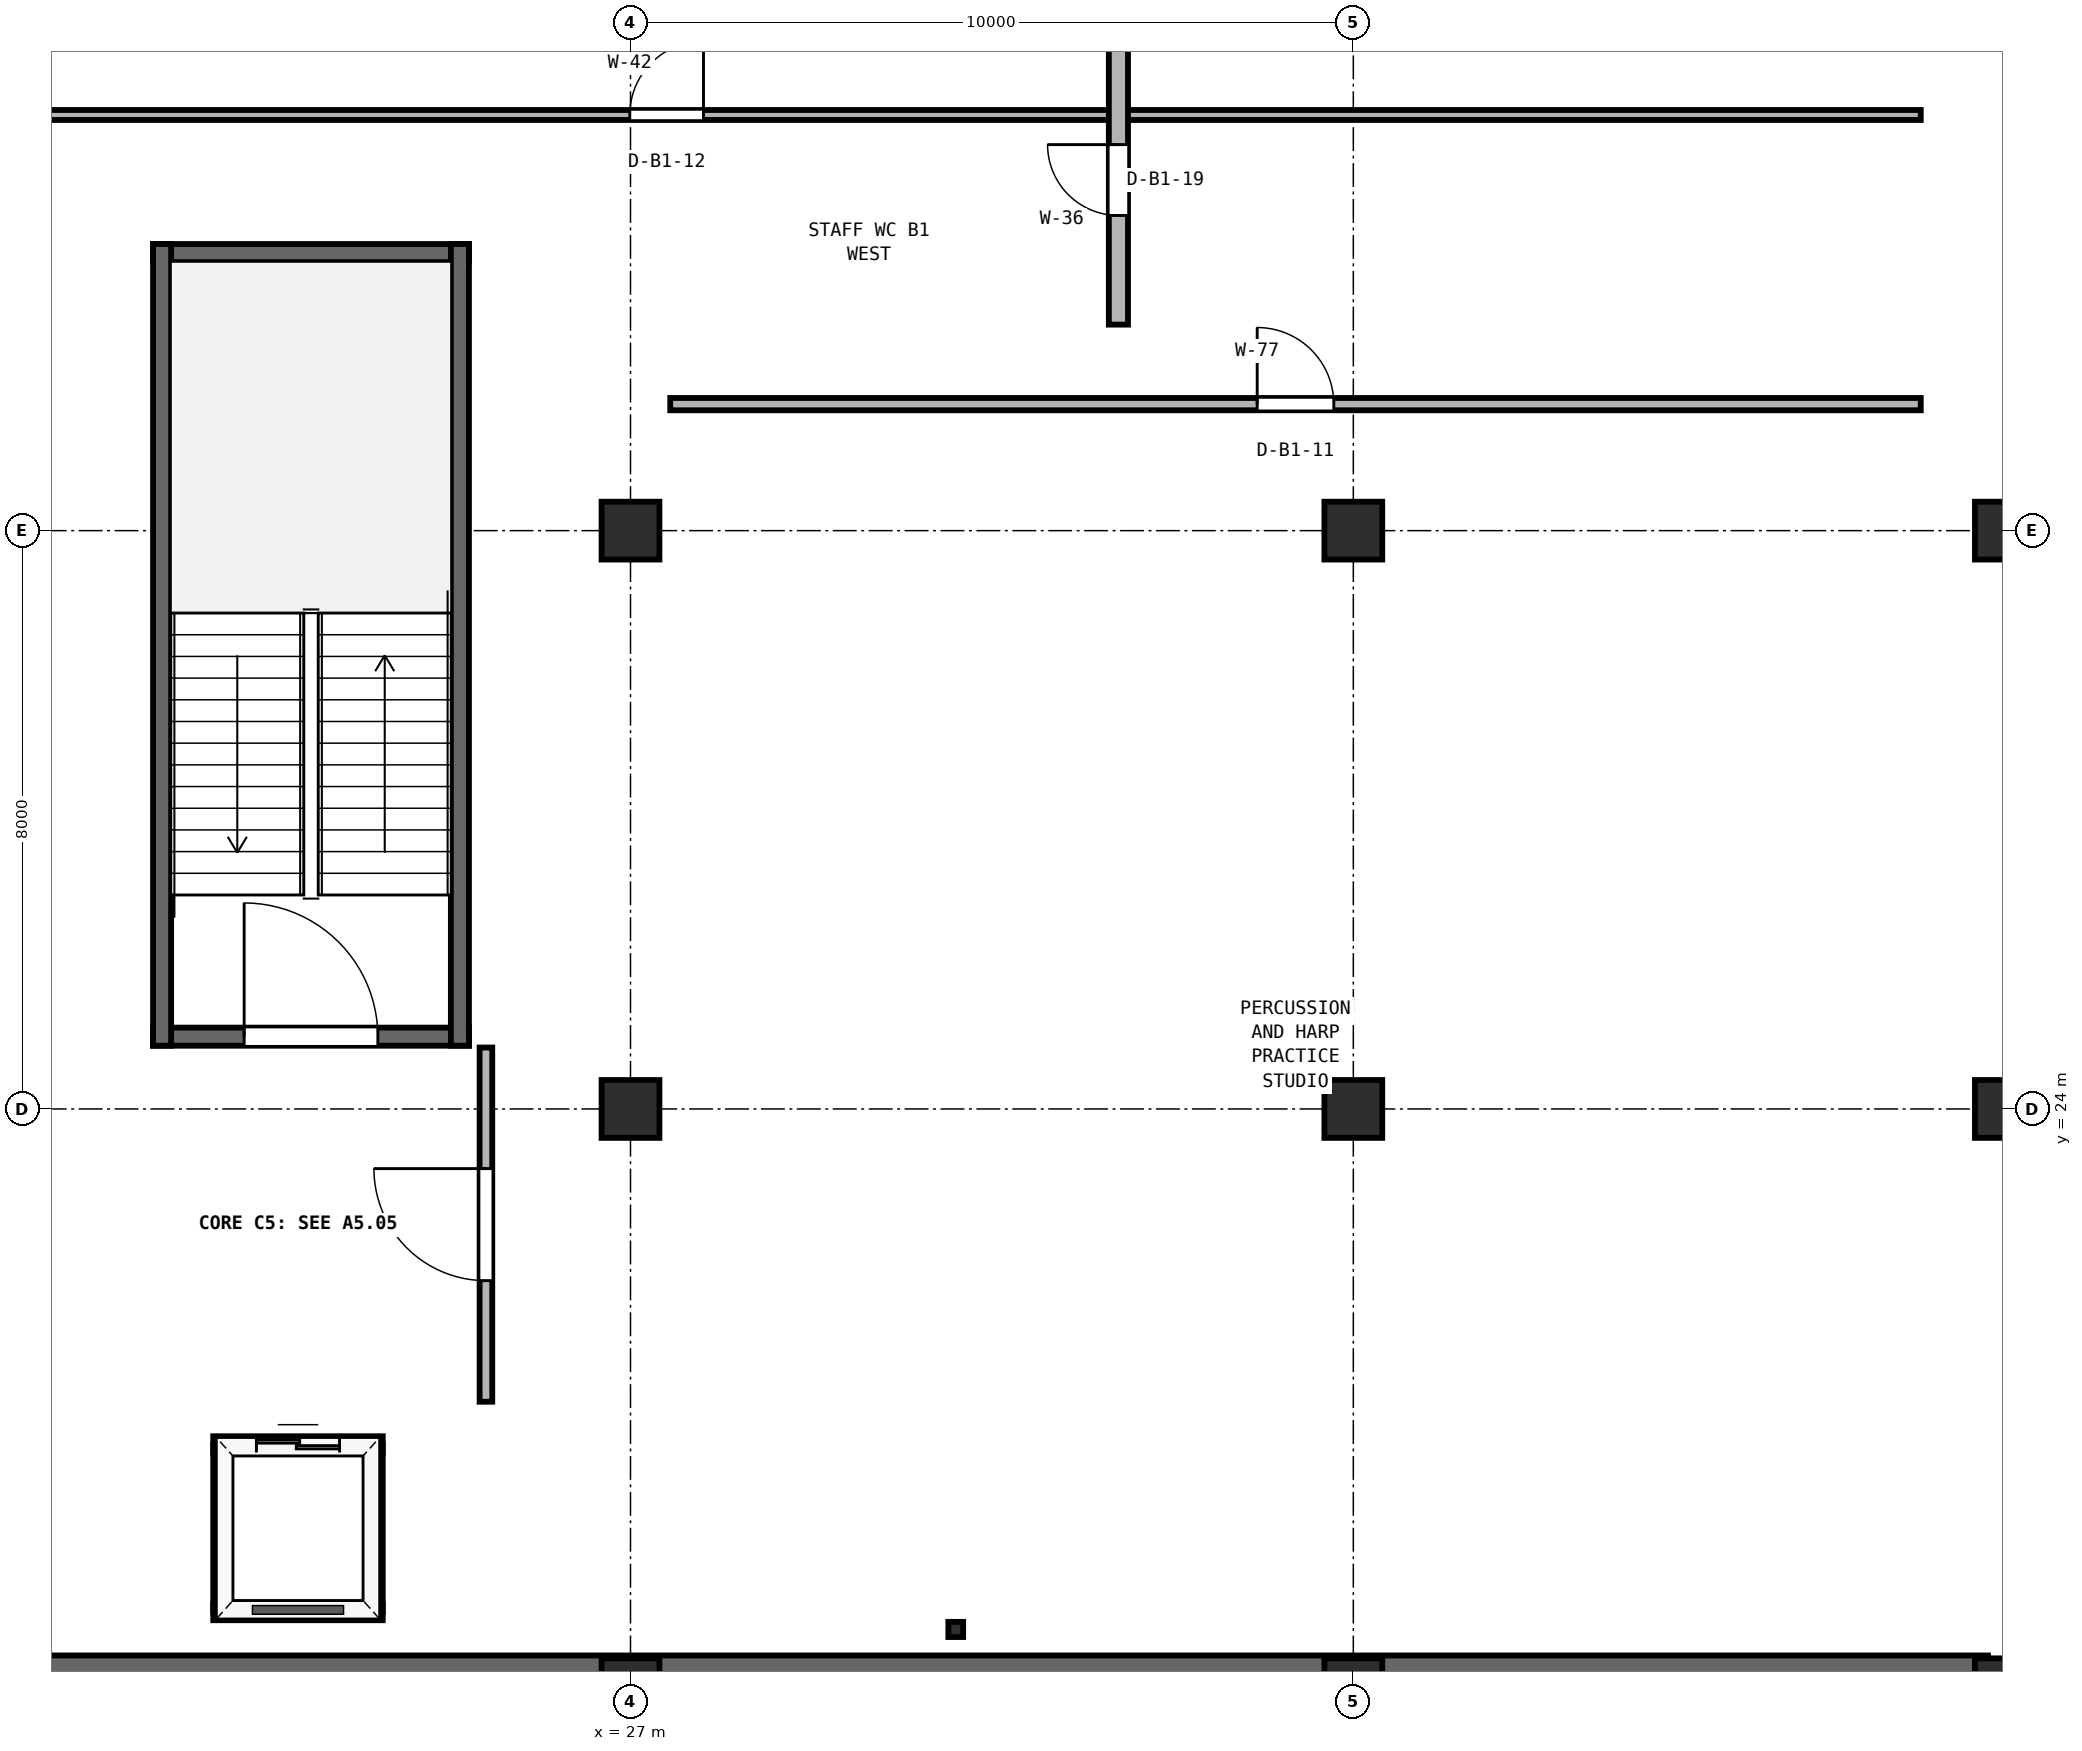
"""IFC4 building model, lengths in metres.
Left out: names, types, materials, properties, quantities, classifications, styles, units other than length and angle.
Written with IfcOpenShell. Run it as: python <this file> out.ifc"""

import sys

from ifc_helpers import new_model, si_unit, direction, frame, frame_2d, origin, origin_2d, place, context, subcontext, project, spatial, rectangle, i_section, extrude, element, fill, save


model = new_model("IFC4")
c1 = context("Model", 3, precision=1e-05, world=origin(), true_north=direction((0.0, 1.0)))
c2 = subcontext(c1, "Body", "Model", "MODEL_VIEW")
j1 = project(units=[si_unit("LENGTHUNIT", "METRE"), si_unit("PLANEANGLEUNIT", "RADIAN")], contexts=[c1])
p1 = place(None, origin())
s1 = spatial("IfcSite", under=j1, at=p1, CompositionType="ELEMENT")
p2 = place(p1, origin())
s2 = spatial("IfcBuilding", under=s1, at=p2, CompositionType="ELEMENT")
p3 = place(p2, frame((0.0, 0.0, -4.8)))
s3 = spatial("IfcBuildingStorey", under=s2, at=p3, CompositionType="ELEMENT", Elevation=-4.8)
p4 = place(p3, frame((9.22, 16.22, 0.0), z_axis=(0.0, 0.0, 1.0), x_axis=(1.0, 0.0, 0.0)))
e1 = element("IfcWall", 1, at=p4, inside=s3, PredefinedType="USERDEFINED", context=c2, shape_type="SweptSolid", body=[
    extrude(rectangle(XDim=36.56, YDim=0.44, at=frame_2d((18.28, 0.0))), origin(), (0.0, 0.0, 1.0), 3.85),
])
for number, where, z_axis, x_axis in (
    (2, (27.0, 16.0, -0.4), (0.0, 0.0, 1.0), (1.0, 0.0, 0.0)),
    (3, (27.0, 24.0, -0.4), (0.0, 0.0, 1.0), (1.0, 0.0, 0.0)),
    (4, (27.0, 32.0, -0.4), (0.0, 0.0, 1.0), (1.0, 0.0, 0.0)),
    (5, (37.0, 16.0, -0.4), (0.0, 0.0, 1.0), (1.0, 0.0, 0.0)),
    (6, (37.0, 24.0, -0.4), (0.0, 0.0, 1.0), (1.0, 0.0, 0.0)),
    (7, (37.0, 32.0, -0.4), (0.0, 0.0, 1.0), (1.0, 0.0, 0.0)),
    (8, (46.0, 16.0, -0.4), (0.0, 0.0, 1.0), (1.0, 0.0, 0.0)),
    (9, (46.0, 24.0, -0.4), (0.0, 0.0, 1.0), (1.0, 0.0, 0.0)),
    (10, (46.0, 32.0, -0.4), (0.0, 0.0, 1.0), (1.0, 0.0, 0.0)),
):
    element("IfcColumn", number, at=place(p3, frame(where, z_axis=z_axis, x_axis=x_axis)), inside=s3, PredefinedType="COLUMN", context=c2, shape_type="SweptSolid", body=[
        extrude(rectangle(XDim=0.8, YDim=0.8, at=origin_2d()), origin(), (0.0, 0.0, 1.0), 4.9),
    ])
for number, where, z_axis, x_axis in (
    (11, (31.5, 16.8, -0.4), (0.0, 0.0, 1.0), (1.0, 0.0, 0.0)),
    (12, (22.5, 17.8, -0.4), (0.0, 0.0, 1.0), (1.0, 0.0, 0.0)),
):
    element("IfcColumn", number, at=place(p3, frame(where, z_axis=z_axis, x_axis=x_axis)), inside=s3, PredefinedType="COLUMN", context=c2, shape_type="SweptSolid", body=[
        extrude(i_section(OverallWidth=0.205, OverallDepth=0.21, WebThickness=0.009, FlangeThickness=0.014, FilletRadius=0.011, at=origin_2d()), origin(), (0.0, 0.0, 1.0), 4.9),
    ])
p5 = place(p3, frame((20.395, 25.0, 0.0), z_axis=(0.0, 0.0, 1.0), x_axis=(1.0, 0.0, 0.0)))
e13 = element("IfcWall", 13, at=p5, inside=s3, PredefinedType="SHEAR", context=c2, shape_type="SweptSolid", body=[
    extrude(rectangle(XDim=4.37, YDim=0.25, at=frame_2d((2.185, 0.0))), origin(), (0.0, 0.0, 1.0), 4.5),
])
p6 = place(p5, frame((1.26, 0.0, 0.0)))
e14 = element("IfcOpeningElement", 14, at=p6, cuts=e13, PredefinedType="OPENING", context=c2, shape_type="SweptSolid", body=[
    extrude(rectangle(XDim=1.85, YDim=2.25, at=frame_2d((0.925, 1.125))), frame((0.0, 0.135, 0.0), z_axis=(0.0, -1.0, 0.0), x_axis=(1.0, 0.0, 0.0)), (0.0, 0.0, 1.0), 0.27),
])
p7 = place(p3, frame((20.395, 35.84, 0.0), z_axis=(0.0, 0.0, 1.0), x_axis=(1.0, 0.0, 0.0)))
e15 = element("IfcWall", 15, at=p7, inside=s3, PredefinedType="SHEAR", context=c2, shape_type="SweptSolid", body=[
    extrude(rectangle(XDim=4.37, YDim=0.25, at=frame_2d((2.185, 0.0))), origin(), (0.0, 0.0, 1.0), 4.5),
])
for number, where, z_axis, x_axis in (
    (16, (20.52, 24.875, 0.0), (0.0, 0.0, 1.0), (0.0, 1.0, 0.0)),
    (17, (24.64, 24.875, 0.0), (0.0, 0.0, 1.0), (0.0, 1.0, 0.0)),
):
    element("IfcWall", number, at=place(p3, frame(where, z_axis=z_axis, x_axis=x_axis)), inside=s3, PredefinedType="SHEAR", context=c2, shape_type="SweptSolid", body=[
        extrude(rectangle(XDim=11.09, YDim=0.25, at=frame_2d((5.545, 0.0))), origin(), (0.0, 0.0, 1.0), 4.5),
    ])
p8 = place(p3, frame((25.0, 19.95, 0.0), z_axis=(0.0, 0.0, 1.0), x_axis=(0.0, 1.0, 0.0)))
e18 = element("IfcWall", 18, at=p8, inside=s3, PredefinedType="PARTITIONING", context=c2, shape_type="SweptSolid", body=[
    extrude(rectangle(XDim=4.9, YDim=0.175, at=frame_2d((2.45, 0.0))), origin(), (0.0, 0.0, 1.0), 4.45),
])
p9 = place(p8, frame((1.675, 0.0, 0.0)))
e19 = element("IfcOpeningElement", 19, at=p9, cuts=e18, PredefinedType="OPENING", context=c2, shape_type="SweptSolid", body=[
    extrude(rectangle(XDim=1.55, YDim=2.22, at=frame_2d((0.775, 1.11))), frame((0.0, 0.097, 0.0), z_axis=(0.0, -1.0, 0.0), x_axis=(1.0, 0.0, 0.0)), (0.0, 0.0, 1.0), 0.195),
])
p10 = place(p3, frame((21.228, 19.36, 0.0), z_axis=(0.0, 0.0, 1.0), x_axis=(1.0, 0.0, 0.0)))
e20 = element("IfcWall", 20, at=p10, inside=s3, PredefinedType="SOLIDWALL", context=c2, shape_type="SweptSolid", body=[
    extrude(rectangle(XDim=2.345, YDim=0.225, at=frame_2d((1.172, 0.0))), origin(), (0.0, 0.0, 1.0), 4.45),
])
p11 = place(p10, frame((0.597, 0.0, 0.0)))
e21 = element("IfcOpeningElement", 21, at=p11, cuts=e20, PredefinedType="OPENING", context=c2, shape_type="SweptSolid", body=[
    extrude(rectangle(XDim=1.15, YDim=2.2, at=frame_2d((0.575, 1.1))), frame((0.0, 0.123, 0.0), z_axis=(0.0, -1.0, 0.0), x_axis=(1.0, 0.0, 0.0)), (0.0, 0.0, 1.0), 0.245),
])
p12 = place(p3, frame((21.228, 17.04, 0.0), z_axis=(0.0, 0.0, 1.0), x_axis=(1.0, 0.0, 0.0)))
e22 = element("IfcWall", 22, at=p12, inside=s3, PredefinedType="SOLIDWALL", context=c2, shape_type="SweptSolid", body=[
    extrude(rectangle(XDim=2.345, YDim=0.225, at=frame_2d((1.172, 0.0))), origin(), (0.0, 0.0, 1.0), 4.45),
])
p13 = place(p3, frame((21.34, 17.04, 0.0), z_axis=(0.0, 0.0, 1.0), x_axis=(0.0, 1.0, 0.0)))
e23 = element("IfcWall", 23, at=p13, inside=s3, PredefinedType="SOLIDWALL", context=c2, shape_type="SweptSolid", body=[
    extrude(rectangle(XDim=2.32, YDim=0.225, at=frame_2d((1.16, 0.0))), origin(), (0.0, 0.0, 1.0), 4.214),
])
p14 = place(p3, frame((23.46, 17.04, 0.0), z_axis=(0.0, 0.0, 1.0), x_axis=(0.0, 1.0, 0.0)))
e24 = element("IfcWall", 24, at=p14, inside=s3, PredefinedType="SOLIDWALL", context=c2, shape_type="SweptSolid", body=[
    extrude(rectangle(XDim=2.32, YDim=0.225, at=frame_2d((1.16, 0.0))), origin(), (0.0, 0.0, 1.0), 4.45),
])
p15 = place(p3, frame((27.55, 33.75, 0.0), z_axis=(0.0, 0.0, 1.0), x_axis=(1.0, 0.0, 0.0)))
e25 = element("IfcWall", 25, at=p15, inside=s3, PredefinedType="MOVABLE", context=c2, shape_type="SweptSolid", body=[
    extrude(rectangle(XDim=17.3, YDim=0.17, at=frame_2d((8.65, 0.0))), origin(), (0.0, 0.0, 1.0), 4.45),
])
p16 = place(p15, frame((8.12, 0.0, 0.0)))
e26 = element("IfcOpeningElement", 26, at=p16, cuts=e25, PredefinedType="OPENING", context=c2, shape_type="SweptSolid", body=[
    extrude(rectangle(XDim=1.06, YDim=2.2, at=frame_2d((0.53, 1.1))), frame((0.0, 0.095, 0.0), z_axis=(0.0, -1.0, 0.0), x_axis=(1.0, 0.0, 0.0)), (0.0, 0.0, 1.0), 0.19),
])
p17 = place(p3, frame((10.15, 37.75, 0.0), z_axis=(0.0, 0.0, 1.0), x_axis=(1.0, 0.0, 0.0)))
e27 = element("IfcWall", 27, at=p17, inside=s3, PredefinedType="PARTITIONING", context=c2, shape_type="SweptSolid", body=[
    extrude(rectangle(XDim=34.7, YDim=0.138, at=frame_2d((17.35, 0.0))), origin(), (0.0, 0.0, 1.0), 4.45),
])
p18 = place(p17, frame((16.84, 0.0, 0.0)))
e28 = element("IfcOpeningElement", 28, at=p18, cuts=e27, PredefinedType="OPENING", context=c2, shape_type="SweptSolid", body=[
    extrude(rectangle(XDim=1.02, YDim=2.18, at=frame_2d((0.51, 1.09))), frame((0.0, 0.079, 0.0), z_axis=(0.0, -1.0, 0.0), x_axis=(1.0, 0.0, 0.0)), (0.0, 0.0, 1.0), 0.158),
])
p19 = place(p3, frame((33.75, 34.85, 0.0), z_axis=(0.0, 0.0, 1.0), x_axis=(0.0, 1.0, 0.0)))
e29 = element("IfcWall", 29, at=p19, inside=s3, PredefinedType="PLUMBINGWALL", context=c2, shape_type="SweptSolid", body=[
    extrude(rectangle(XDim=4.0, YDim=0.265, at=frame_2d((2.0, 0.0))), origin(), (0.0, 0.0, 1.0), 4.163),
])
p20 = place(p19, frame((1.51, 0.0, 0.0)))
e30 = element("IfcOpeningElement", 30, at=p20, cuts=e29, PredefinedType="OPENING", context=c2, shape_type="SweptSolid", body=[
    extrude(rectangle(XDim=0.98, YDim=2.14, at=frame_2d((0.49, 1.07))), frame((0.0, 0.142, 0.0), z_axis=(0.0, -1.0, 0.0), x_axis=(1.0, 0.0, 0.0)), (0.0, 0.0, 1.0), 0.285),
])
p21 = place(p6, origin())
e31 = element("IfcDoor", 31, at=p21, inside=s3, OperationType="SINGLE_SWING_LEFT", PredefinedType="DOOR", context=c2, shape_type="SweptSolid", body=[
    extrude(rectangle(XDim=1.85, YDim=2.25, at=frame_2d((0.925, 1.125))), frame((0.0, 0.025, 0.0), z_axis=(0.0, -1.0, 0.0), x_axis=(1.0, 0.0, 0.0)), (0.0, 0.0, 1.0), 0.05),
])
fill(e14, e31)
p22 = place(p9, origin())
e32 = element("IfcDoor", 32, at=p22, inside=s3, OperationType="SINGLE_SWING_RIGHT", PredefinedType="DOOR", context=c2, shape_type="SweptSolid", body=[
    extrude(rectangle(XDim=1.55, YDim=2.22, at=frame_2d((0.775, 1.11))), frame((0.0, 0.025, 0.0), z_axis=(0.0, -1.0, 0.0), x_axis=(1.0, 0.0, 0.0)), (0.0, 0.0, 1.0), 0.05),
])
fill(e19, e32)
p23 = place(p11, origin())
e33 = element("IfcDoor", 33, at=p23, inside=s3, OperationType="DOUBLE_DOOR_SLIDING", PredefinedType="DOOR", context=c2, shape_type="SweptSolid", body=[
    extrude(rectangle(XDim=1.15, YDim=2.2, at=frame_2d((0.575, 1.1))), frame((0.0, 0.025, 0.0), z_axis=(0.0, -1.0, 0.0), x_axis=(1.0, 0.0, 0.0)), (0.0, 0.0, 1.0), 0.05),
])
fill(e21, e33)
p24 = place(p16, origin())
e34 = element("IfcDoor", 34, at=p24, inside=s3, OperationType="SINGLE_SWING_LEFT", PredefinedType="DOOR", context=c2, shape_type="SweptSolid", body=[
    extrude(rectangle(XDim=1.06, YDim=2.2, at=frame_2d((0.53, 1.1))), frame((0.0, 0.025, 0.0), z_axis=(0.0, -1.0, 0.0), x_axis=(1.0, 0.0, 0.0)), (0.0, 0.0, 1.0), 0.05),
])
fill(e26, e34)
p25 = place(p18, origin())
e35 = element("IfcDoor", 35, at=p25, inside=s3, OperationType="SINGLE_SWING_RIGHT", PredefinedType="DOOR", context=c2, shape_type="SweptSolid", body=[
    extrude(rectangle(XDim=1.02, YDim=2.18, at=frame_2d((0.51, 1.09))), frame((0.0, 0.025, 0.0), z_axis=(0.0, -1.0, 0.0), x_axis=(1.0, 0.0, 0.0)), (0.0, 0.0, 1.0), 0.05),
])
fill(e28, e35)
p26 = place(p20, origin())
e36 = element("IfcDoor", 36, at=p26, inside=s3, OperationType="SINGLE_SWING_RIGHT", PredefinedType="DOOR", context=c2, shape_type="SweptSolid", body=[
    extrude(rectangle(XDim=0.98, YDim=2.14, at=frame_2d((0.49, 1.07))), frame((0.0, 0.025, 0.0), z_axis=(0.0, -1.0, 0.0), x_axis=(1.0, 0.0, 0.0)), (0.0, 0.0, 1.0), 0.05),
])
fill(e30, e36)
save(model, sys.argv[1])
